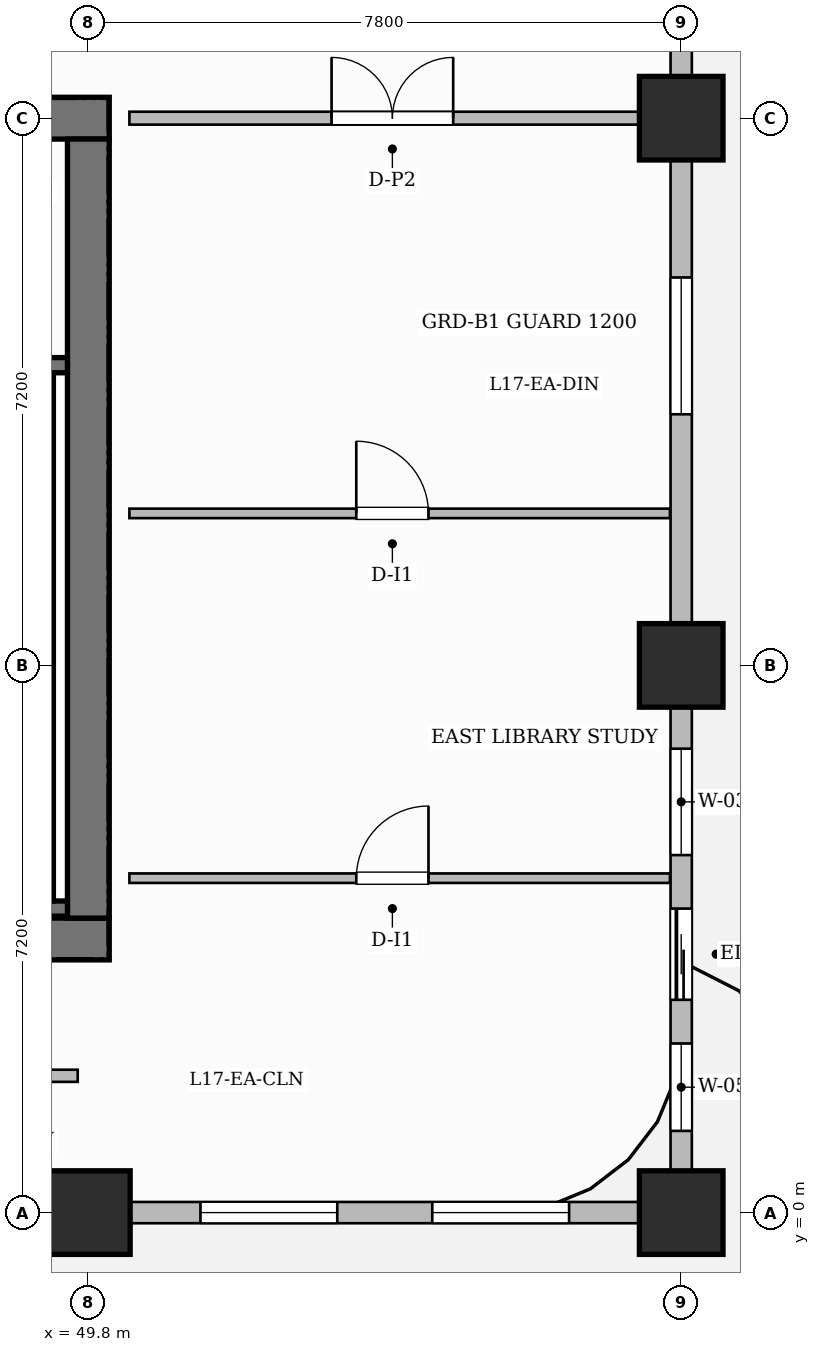
"""IFC4 building model, lengths in metres.
Left out: names, types, materials, properties, quantities, classifications, styles, units other than length and angle.
Written with IfcOpenShell. Run it as: python <this file> out.ifc"""

import sys

from ifc_helpers import new_model, si_unit, direction, frame, frame_2d, origin, origin_2d, place, context, subcontext, project, spatial, rectangle, extrude, source, transform, mapped, element, fill, save


model = new_model("IFC4")
c1 = context("Model", 3, precision=1e-05, world=origin(), true_north=direction((0.0, 1.0)))
c2 = subcontext(c1, "Body", "Model", "MODEL_VIEW")
j1 = project(units=[si_unit("LENGTHUNIT", "METRE"), si_unit("PLANEANGLEUNIT", "RADIAN")], contexts=[c1])
p1 = place(None, origin())
s1 = spatial("IfcSite", under=j1, at=p1, CompositionType="ELEMENT")
p2 = place(p1, origin())
s2 = spatial("IfcBuilding", under=s1, at=p2, CompositionType="ELEMENT")
p3 = place(p2, frame((0.0, 0.0, 73.1)))
s3 = spatial("IfcBuildingStorey", under=s2, at=p3, CompositionType="ELEMENT", Elevation=73.1)
p4 = place(p3, frame((34.525, 3.6, 0.0), z_axis=(0.0, 0.0, 1.0), x_axis=(1.0, 0.0, 0.0)))
e1 = element("IfcWall", 1, at=p4, inside=s3, PredefinedType="SHEAR", context=c2, shape_type="SweptSolid", body=[
    extrude(rectangle(XDim=15.55, YDim=0.55, at=frame_2d((7.775, 0.0))), origin(), (0.0, 0.0, 1.0), 3.7),
])
p5 = place(p4, frame((4.825, 0.0, 0.0)))
e2 = element("IfcOpeningElement", 2, at=p5, cuts=e1, PredefinedType="OPENING", context=c2, shape_type="SweptSolid", body=[
    extrude(rectangle(XDim=0.9, YDim=2.1, at=frame_2d((0.45, 1.05))), frame((0.0, 0.285, 0.0), z_axis=(0.0, -1.0, 0.0), x_axis=(1.0, 0.0, 0.0)), (0.0, 0.0, 1.0), 0.57),
])
p6 = place(p4, frame((7.245, 0.0, 0.0)))
e3 = element("IfcOpeningElement", 3, at=p6, cuts=e1, PredefinedType="OPENING", context=c2, shape_type="SweptSolid", body=[
    extrude(rectangle(XDim=0.9, YDim=2.1, at=frame_2d((0.45, 1.05))), frame((0.0, 0.285, 0.0), z_axis=(0.0, -1.0, 0.0), x_axis=(1.0, 0.0, 0.0)), (0.0, 0.0, 1.0), 0.57),
])
p7 = place(p3, frame((34.525, 14.4, 0.0), z_axis=(0.0, 0.0, 1.0), x_axis=(1.0, 0.0, 0.0)))
e4 = element("IfcWall", 4, at=p7, inside=s3, PredefinedType="SHEAR", context=c2, shape_type="SweptSolid", body=[
    extrude(rectangle(XDim=15.55, YDim=0.55, at=frame_2d((7.775, 0.0))), origin(), (0.0, 0.0, 1.0), 3.7),
])
p8 = place(p7, frame((5.405, 0.0, 0.0)))
e5 = element("IfcOpeningElement", 5, at=p8, cuts=e4, PredefinedType="OPENING", context=c2, shape_type="SweptSolid", body=[
    extrude(rectangle(XDim=1.5, YDim=2.2, at=frame_2d((0.75, 1.1))), frame((0.0, 0.285, 0.0), z_axis=(0.0, -1.0, 0.0), x_axis=(1.0, 0.0, 0.0)), (0.0, 0.0, 1.0), 0.57),
])
p9 = place(p7, frame((1.62, 0.0, 0.0)))
e6 = element("IfcOpeningElement", 6, at=p9, cuts=e4, PredefinedType="OPENING", context=c2, shape_type="SweptSolid", body=[
    extrude(rectangle(XDim=1.05, YDim=2.15, at=frame_2d((0.525, 1.075))), frame((0.0, 0.285, 0.0), z_axis=(0.0, -1.0, 0.0), x_axis=(1.0, 0.0, 0.0)), (0.0, 0.0, 1.0), 0.57),
])
p10 = place(p7, frame((11.25, 0.0, 0.0)))
e7 = element("IfcOpeningElement", 7, at=p10, cuts=e4, PredefinedType="OPENING", context=c2, shape_type="SweptSolid", body=[
    extrude(rectangle(XDim=1.05, YDim=2.15, at=frame_2d((0.525, 1.075))), frame((0.0, 0.285, 0.0), z_axis=(0.0, -1.0, 0.0), x_axis=(1.0, 0.0, 0.0)), (0.0, 0.0, 1.0), 0.57),
])
p11 = place(p3, frame((49.8, 3.875, 0.0), z_axis=(0.0, 0.0, 1.0), x_axis=(0.0, 1.0, 0.0)))
e8 = element("IfcWall", 8, at=p11, inside=s3, PredefinedType="SHEAR", context=c2, shape_type="SweptSolid", body=[
    extrude(rectangle(XDim=10.25, YDim=0.55, at=frame_2d((5.125, 0.0))), origin(), (0.0, 0.0, 1.0), 3.7),
])
m1 = source(origin(), c2, "Body", "SweptSolid", [
    extrude(rectangle(XDim=1.1, YDim=1.1, at=origin_2d()), origin(), (0.0, 0.0, 1.0), 3.7),
])
for number, where, z_axis, x_axis in (
    (9, (49.8, 0.0, 0.0), (0.0, 0.0, 1.0), (1.0, 0.0, 0.0)),
    (10, (57.6, 0.0, 0.0), (0.0, 0.0, 1.0), (1.0, 0.0, 0.0)),
    (11, (57.6, 7.2, 0.0), (0.0, 0.0, 1.0), (1.0, 0.0, 0.0)),
    (12, (57.6, 14.4, 0.0), (0.0, 0.0, 1.0), (1.0, 0.0, 0.0)),
):
    element("IfcColumn", number, at=place(p3, frame(where, z_axis=z_axis, x_axis=x_axis)), inside=s3, PredefinedType="COLUMN", context=c2, shape_type="MappedRepresentation", body=[
        mapped(m1, transform((0.0, 0.0, 0.0), scale=1.0)),
    ])
p12 = place(p3, frame((43.12, 4.0, 0.0), z_axis=(0.0, 0.0, 1.0), x_axis=(1.0, 0.0, 0.0)))
e13 = element("IfcWall", 13, at=p12, inside=s3, PredefinedType="SHEAR", context=c2, shape_type="SweptSolid", body=[
    extrude(rectangle(XDim=6.405, YDim=0.2, at=frame_2d((3.202, 0.0))), origin(), (0.0, 0.0, 1.0), 3.7),
])
p13 = place(p3, frame((49.24, 4.1, 0.0), z_axis=(0.0, 0.0, 1.0), x_axis=(0.0, 1.0, 0.0)))
e14 = element("IfcWall", 14, at=p13, inside=s3, PredefinedType="SHEAR", context=c2, shape_type="SweptSolid", body=[
    extrude(rectangle(XDim=6.95, YDim=0.2, at=frame_2d((3.475, 0.0))), origin(), (0.0, 0.0, 1.0), 3.7),
])
p14 = place(p3, frame((43.12, 11.15, 0.0), z_axis=(0.0, 0.0, 1.0), x_axis=(1.0, 0.0, 0.0)))
e15 = element("IfcWall", 15, at=p14, inside=s3, PredefinedType="SHEAR", context=c2, shape_type="SweptSolid", body=[
    extrude(rectangle(XDim=6.405, YDim=0.2, at=frame_2d((3.202, 0.0))), origin(), (0.0, 0.0, 1.0), 3.7),
])
p15 = place(p14, frame((1.045, 0.0, 0.0)))
e16 = element("IfcOpeningElement", 16, at=p15, cuts=e15, PredefinedType="OPENING", context=c2, shape_type="SweptSolid", body=[
    extrude(rectangle(XDim=1.05, YDim=2.2, at=frame_2d((0.525, 1.1))), frame((0.0, 0.11, 0.0), z_axis=(0.0, -1.0, 0.0), x_axis=(1.0, 0.0, 0.0)), (0.0, 0.0, 1.0), 0.22),
])
p16 = place(p14, frame((4.125, 0.0, 0.0)))
e17 = element("IfcOpeningElement", 17, at=p16, cuts=e15, PredefinedType="OPENING", context=c2, shape_type="SweptSolid", body=[
    extrude(rectangle(XDim=1.05, YDim=2.2, at=frame_2d((0.525, 1.1))), frame((0.0, 0.11, 0.0), z_axis=(0.0, -1.0, 0.0), x_axis=(1.0, 0.0, 0.0)), (0.0, 0.0, 1.0), 0.22),
])
p17 = place(p3, frame((30.29, 1.8, 0.0), z_axis=(0.0, 0.0, 1.0), x_axis=(1.0, 0.0, 0.0)))
e18 = element("IfcWall", 18, at=p17, inside=s3, PredefinedType="PARTITIONING", context=c2, shape_type="SweptSolid", body=[
    extrude(rectangle(XDim=19.37, YDim=0.16, at=frame_2d((9.685, 0.0))), origin(), (0.0, 0.0, 1.0), 3.45),
])
p18 = place(p17, frame((2.916, 0.0, 0.0)))
e19 = element("IfcOpeningElement", 19, at=p18, cuts=e18, PredefinedType="OPENING", context=c2, shape_type="SweptSolid", body=[
    extrude(rectangle(XDim=0.9, YDim=2.15, at=frame_2d((0.45, 1.075))), frame((0.0, 0.09, 0.0), z_axis=(0.0, -1.0, 0.0), x_axis=(1.0, 0.0, 0.0)), (0.0, 0.0, 1.0), 0.18),
])
p19 = place(p17, frame((9.66, 0.0, 0.0)))
e20 = element("IfcOpeningElement", 20, at=p19, cuts=e18, PredefinedType="OPENING", context=c2, shape_type="SweptSolid", body=[
    extrude(rectangle(XDim=0.9, YDim=2.15, at=frame_2d((0.45, 1.075))), frame((0.0, 0.09, 0.0), z_axis=(0.0, -1.0, 0.0), x_axis=(1.0, 0.0, 0.0)), (0.0, 0.0, 1.0), 0.18),
])
p20 = place(p17, frame((15.86, 0.0, 0.0)))
e21 = element("IfcOpeningElement", 21, at=p20, cuts=e18, PredefinedType="OPENING", context=c2, shape_type="SweptSolid", body=[
    extrude(rectangle(XDim=0.9, YDim=2.15, at=frame_2d((0.45, 1.075))), frame((0.0, 0.09, 0.0), z_axis=(0.0, -1.0, 0.0), x_axis=(1.0, 0.0, 0.0)), (0.0, 0.0, 1.0), 0.18),
])
p21 = place(p3, frame((50.34, 14.4, 0.0), z_axis=(0.0, 0.0, 1.0), x_axis=(1.0, 0.0, 0.0)))
e22 = element("IfcWall", 22, at=p21, inside=s3, PredefinedType="PARTITIONING", context=c2, shape_type="SweptSolid", body=[
    extrude(rectangle(XDim=7.07, YDim=0.17, at=frame_2d((3.535, 0.0))), origin(), (0.0, 0.0, 1.0), 2.885),
])
p22 = place(p21, frame((2.66, 0.0, 0.0)))
e23 = element("IfcOpeningElement", 23, at=p22, cuts=e22, PredefinedType="OPENING", context=c2, shape_type="SweptSolid", body=[
    extrude(rectangle(XDim=1.6, YDim=2.4, at=frame_2d((0.8, 1.2))), frame((0.0, 0.095, 0.0), z_axis=(0.0, -1.0, 0.0), x_axis=(1.0, 0.0, 0.0)), (0.0, 0.0, 1.0), 0.19),
])
p23 = place(p3, frame((50.34, 9.2, 0.0), z_axis=(0.0, 0.0, 1.0), x_axis=(1.0, 0.0, 0.0)))
e24 = element("IfcWall", 24, at=p23, inside=s3, PredefinedType="PARTITIONING", context=c2, shape_type="SweptSolid", body=[
    extrude(rectangle(XDim=7.112, YDim=0.125, at=frame_2d((3.556, 0.0))), origin(), (0.0, 0.0, 1.0), 3.45),
])
p24 = place(p23, frame((2.985, 0.0, 0.0)))
e25 = element("IfcOpeningElement", 25, at=p24, cuts=e24, PredefinedType="OPENING", context=c2, shape_type="SweptSolid", body=[
    extrude(rectangle(XDim=0.95, YDim=2.15, at=frame_2d((0.475, 1.075))), frame((0.0, 0.073, 0.0), z_axis=(0.0, -1.0, 0.0), x_axis=(1.0, 0.0, 0.0)), (0.0, 0.0, 1.0), 0.145),
])
p25 = place(p3, frame((50.34, 4.4, 0.0), z_axis=(0.0, 0.0, 1.0), x_axis=(1.0, 0.0, 0.0)))
e26 = element("IfcWall", 26, at=p25, inside=s3, PredefinedType="PARTITIONING", context=c2, shape_type="SweptSolid", body=[
    extrude(rectangle(XDim=7.112, YDim=0.125, at=frame_2d((3.556, 0.0))), origin(), (0.0, 0.0, 1.0), 3.45),
])
p26 = place(p25, frame((2.985, 0.0, 0.0)))
e27 = element("IfcOpeningElement", 27, at=p26, cuts=e26, PredefinedType="OPENING", context=c2, shape_type="SweptSolid", body=[
    extrude(rectangle(XDim=0.95, YDim=2.15, at=frame_2d((0.475, 1.075))), frame((0.0, 0.073, 0.0), z_axis=(0.0, -1.0, 0.0), x_axis=(1.0, 0.0, 0.0)), (0.0, 0.0, 1.0), 0.145),
])
p27 = place(p3, frame((14.4, 0.0, 0.0), z_axis=(0.0, 0.0, 1.0), x_axis=(1.0, 0.0, 0.0)))
e28 = element("IfcWall", 28, at=p27, inside=s3, PredefinedType="SOLIDWALL", context=c2, shape_type="SweptSolid", body=[
    extrude(rectangle(XDim=43.2, YDim=0.28, at=frame_2d((21.6, 0.0))), origin(), (0.0, 0.0, 1.0), 2.885),
])
p28 = place(p27, frame((0.85, 0.0, 0.0)))
e29 = element("IfcOpeningElement", 29, at=p28, cuts=e28, PredefinedType="OPENING", context=c2, shape_type="SweptSolid", body=[
    extrude(rectangle(XDim=1.2, YDim=2.2, at=frame_2d((0.6, 1.1))), frame((0.0, 0.15, 0.0), z_axis=(0.0, -1.0, 0.0), x_axis=(1.0, 0.0, 0.0)), (0.0, 0.0, 1.0), 0.3),
])
p29 = place(p27, frame((2.811, 0.0, 0.8)))
e30 = element("IfcOpeningElement", 30, at=p29, cuts=e28, PredefinedType="OPENING", context=c2, shape_type="SweptSolid", body=[
    extrude(rectangle(XDim=1.8, YDim=1.85, at=frame_2d((0.9, 0.925))), frame((0.0, 0.15, 0.0), z_axis=(0.0, -1.0, 0.0), x_axis=(1.0, 0.0, 0.0)), (0.0, 0.0, 1.0), 0.3),
])
p30 = place(p27, frame((5.269, 0.0, 0.8)))
e31 = element("IfcOpeningElement", 31, at=p30, cuts=e28, PredefinedType="OPENING", context=c2, shape_type="SweptSolid", body=[
    extrude(rectangle(XDim=0.95, YDim=1.75, at=frame_2d((0.475, 0.875))), frame((0.0, 0.15, 0.0), z_axis=(0.0, -1.0, 0.0), x_axis=(1.0, 0.0, 0.0)), (0.0, 0.0, 1.0), 0.3),
])
p31 = place(p27, frame((8.389, 0.0, 0.8)))
e32 = element("IfcOpeningElement", 32, at=p31, cuts=e28, PredefinedType="OPENING", context=c2, shape_type="SweptSolid", body=[
    extrude(rectangle(XDim=1.8, YDim=1.85, at=frame_2d((0.9, 0.925))), frame((0.0, 0.15, 0.0), z_axis=(0.0, -1.0, 0.0), x_axis=(1.0, 0.0, 0.0)), (0.0, 0.0, 1.0), 0.3),
])
p32 = place(p27, frame((11.197, 0.0, 0.8)))
e33 = element("IfcOpeningElement", 33, at=p32, cuts=e28, PredefinedType="OPENING", context=c2, shape_type="SweptSolid", body=[
    extrude(rectangle(XDim=1.8, YDim=1.85, at=frame_2d((0.9, 0.925))), frame((0.0, 0.15, 0.0), z_axis=(0.0, -1.0, 0.0), x_axis=(1.0, 0.0, 0.0)), (0.0, 0.0, 1.0), 0.3),
])
p33 = place(p27, frame((16.804, 0.0, 0.8)))
e34 = element("IfcOpeningElement", 34, at=p33, cuts=e28, PredefinedType="OPENING", context=c2, shape_type="SweptSolid", body=[
    extrude(rectangle(XDim=1.8, YDim=1.85, at=frame_2d((0.9, 0.925))), frame((0.0, 0.15, 0.0), z_axis=(0.0, -1.0, 0.0), x_axis=(1.0, 0.0, 0.0)), (0.0, 0.0, 1.0), 0.3),
])
p34 = place(p27, frame((21.521, 0.0, 0.8)))
e35 = element("IfcOpeningElement", 35, at=p34, cuts=e28, PredefinedType="OPENING", context=c2, shape_type="SweptSolid", body=[
    extrude(rectangle(XDim=0.95, YDim=1.75, at=frame_2d((0.475, 0.875))), frame((0.0, 0.15, 0.0), z_axis=(0.0, -1.0, 0.0), x_axis=(1.0, 0.0, 0.0)), (0.0, 0.0, 1.0), 0.3),
])
p35 = place(p27, frame((23.904, 0.0, 0.8)))
e36 = element("IfcOpeningElement", 36, at=p35, cuts=e28, PredefinedType="OPENING", context=c2, shape_type="SweptSolid", body=[
    extrude(rectangle(XDim=1.8, YDim=1.85, at=frame_2d((0.9, 0.925))), frame((0.0, 0.15, 0.0), z_axis=(0.0, -1.0, 0.0), x_axis=(1.0, 0.0, 0.0)), (0.0, 0.0, 1.0), 0.3),
])
p36 = place(p27, frame((29.681, 0.0, 0.8)))
e37 = element("IfcOpeningElement", 37, at=p36, cuts=e28, PredefinedType="OPENING", context=c2, shape_type="SweptSolid", body=[
    extrude(rectangle(XDim=1.8, YDim=1.85, at=frame_2d((0.9, 0.925))), frame((0.0, 0.15, 0.0), z_axis=(0.0, -1.0, 0.0), x_axis=(1.0, 0.0, 0.0)), (0.0, 0.0, 1.0), 0.3),
])
p37 = place(p27, frame((32.327, 0.0, 0.8)))
e38 = element("IfcOpeningElement", 38, at=p37, cuts=e28, PredefinedType="OPENING", context=c2, shape_type="SweptSolid", body=[
    extrude(rectangle(XDim=1.8, YDim=1.85, at=frame_2d((0.9, 0.925))), frame((0.0, 0.15, 0.0), z_axis=(0.0, -1.0, 0.0), x_axis=(1.0, 0.0, 0.0)), (0.0, 0.0, 1.0), 0.3),
])
p38 = place(p27, frame((36.875, 0.0, 0.8)))
e39 = element("IfcOpeningElement", 39, at=p38, cuts=e28, PredefinedType="OPENING", context=c2, shape_type="SweptSolid", body=[
    extrude(rectangle(XDim=1.8, YDim=1.85, at=frame_2d((0.9, 0.925))), frame((0.0, 0.15, 0.0), z_axis=(0.0, -1.0, 0.0), x_axis=(1.0, 0.0, 0.0)), (0.0, 0.0, 1.0), 0.3),
])
p39 = place(p27, frame((39.925, 0.0, 0.8)))
e40 = element("IfcOpeningElement", 40, at=p39, cuts=e28, PredefinedType="OPENING", context=c2, shape_type="SweptSolid", body=[
    extrude(rectangle(XDim=1.8, YDim=1.85, at=frame_2d((0.9, 0.925))), frame((0.0, 0.15, 0.0), z_axis=(0.0, -1.0, 0.0), x_axis=(1.0, 0.0, 0.0)), (0.0, 0.0, 1.0), 0.3),
])
p40 = place(p3, frame((57.6, 0.05, 0.0), z_axis=(0.0, 0.0, 1.0), x_axis=(0.0, 1.0, 0.0)))
e41 = element("IfcWall", 41, at=p40, inside=s3, PredefinedType="SOLIDWALL", context=c2, shape_type="SweptSolid", body=[
    extrude(rectangle(XDim=21.5, YDim=0.28, at=frame_2d((10.75, 0.0))), origin(), (0.0, 0.0, 1.0), 2.885),
])
p41 = place(p40, frame((2.75, 0.0, 0.0)))
e42 = element("IfcOpeningElement", 42, at=p41, cuts=e41, PredefinedType="OPENING", context=c2, shape_type="SweptSolid", body=[
    extrude(rectangle(XDim=1.2, YDim=2.2, at=frame_2d((0.6, 1.1))), frame((0.0, 0.15, 0.0), z_axis=(0.0, -1.0, 0.0), x_axis=(1.0, 0.0, 0.0)), (0.0, 0.0, 1.0), 0.3),
])
p42 = place(p40, frame((1.025, 0.0, 0.8)))
e43 = element("IfcOpeningElement", 43, at=p42, cuts=e41, PredefinedType="OPENING", context=c2, shape_type="SweptSolid", body=[
    extrude(rectangle(XDim=1.15, YDim=1.8, at=frame_2d((0.575, 0.9))), frame((0.0, 0.15, 0.0), z_axis=(0.0, -1.0, 0.0), x_axis=(1.0, 0.0, 0.0)), (0.0, 0.0, 1.0), 0.3),
])
p43 = place(p40, frame((4.654, 0.0, 0.8)))
e44 = element("IfcOpeningElement", 44, at=p43, cuts=e41, PredefinedType="OPENING", context=c2, shape_type="SweptSolid", body=[
    extrude(rectangle(XDim=1.4, YDim=1.85, at=frame_2d((0.7, 0.925))), frame((0.0, 0.15, 0.0), z_axis=(0.0, -1.0, 0.0), x_axis=(1.0, 0.0, 0.0)), (0.0, 0.0, 1.0), 0.3),
])
p44 = place(p40, frame((10.454, 0.0, 0.8)))
e45 = element("IfcOpeningElement", 45, at=p44, cuts=e41, PredefinedType="OPENING", context=c2, shape_type="SweptSolid", body=[
    extrude(rectangle(XDim=1.8, YDim=1.85, at=frame_2d((0.9, 0.925))), frame((0.0, 0.15, 0.0), z_axis=(0.0, -1.0, 0.0), x_axis=(1.0, 0.0, 0.0)), (0.0, 0.0, 1.0), 0.3),
])
p45 = place(p40, frame((15.621, 0.0, 0.8)))
e46 = element("IfcOpeningElement", 46, at=p45, cuts=e41, PredefinedType="OPENING", context=c2, shape_type="SweptSolid", body=[
    extrude(rectangle(XDim=1.4, YDim=1.85, at=frame_2d((0.7, 0.925))), frame((0.0, 0.15, 0.0), z_axis=(0.0, -1.0, 0.0), x_axis=(1.0, 0.0, 0.0)), (0.0, 0.0, 1.0), 0.3),
])
p46 = place(p40, frame((18.229, 0.0, 0.8)))
e47 = element("IfcOpeningElement", 47, at=p46, cuts=e41, PredefinedType="OPENING", context=c2, shape_type="SweptSolid", body=[
    extrude(rectangle(XDim=1.8, YDim=1.85, at=frame_2d((0.9, 0.925))), frame((0.0, 0.15, 0.0), z_axis=(0.0, -1.0, 0.0), x_axis=(1.0, 0.0, 0.0)), (0.0, 0.0, 1.0), 0.3),
])
m2 = source(origin(), c2, "Body", "SweptSolid", [
    extrude(rectangle(XDim=1.6, YDim=2.4, at=frame_2d((0.8, 1.2))), frame((0.0, 0.025, 0.0), z_axis=(0.0, -1.0, 0.0), x_axis=(1.0, 0.0, 0.0)), (0.0, 0.0, 1.0), 0.05),
])
p47 = place(p22, origin())
e48 = element("IfcDoor", 48, at=p47, inside=s3, OperationType="DOUBLE_DOOR_SINGLE_SWING", PredefinedType="DOOR", context=c2, shape_type="MappedRepresentation", body=[
    mapped(m2, transform((0.0, 0.0, 0.0), scale=1.0)),
])
fill(e23, e48)
m3 = source(origin(), c2, "Body", "SweptSolid", [
    extrude(rectangle(XDim=0.95, YDim=2.15, at=frame_2d((0.475, 1.075))), frame((0.0, 0.025, 0.0), z_axis=(0.0, -1.0, 0.0), x_axis=(1.0, 0.0, 0.0)), (0.0, 0.0, 1.0), 0.05),
])
p48 = place(p24, origin())
e49 = element("IfcDoor", 49, at=p48, inside=s3, OperationType="SINGLE_SWING_LEFT", PredefinedType="DOOR", context=c2, shape_type="MappedRepresentation", body=[
    mapped(m3, transform((0.0, 0.0, 0.0), scale=1.0)),
])
fill(e25, e49)
p49 = place(p26, origin())
e50 = element("IfcDoor", 50, at=p49, inside=s3, OperationType="SINGLE_SWING_RIGHT", PredefinedType="DOOR", context=c2, shape_type="MappedRepresentation", body=[
    mapped(m3, transform((0.0, 0.0, 0.0), scale=1.0)),
])
fill(e27, e50)
m4 = source(origin(), c2, "Body", "SweptSolid", [
    extrude(rectangle(XDim=1.2, YDim=2.2, at=frame_2d((0.6, 1.1))), frame((0.0, 0.025, 0.0), z_axis=(0.0, -1.0, 0.0), x_axis=(1.0, 0.0, 0.0)), (0.0, 0.0, 1.0), 0.05),
])
p50 = place(p41, origin())
e51 = element("IfcDoor", 51, at=p50, inside=s3, OperationType="SLIDING_TO_LEFT", PredefinedType="DOOR", context=c2, shape_type="MappedRepresentation", body=[
    mapped(m4, transform((0.0, 0.0, 0.0), scale=1.0)),
])
fill(e42, e51)
m5 = source(origin(), c2, "Body", "SweptSolid", [
    extrude(rectangle(XDim=1.8, YDim=1.85, at=frame_2d((0.9, 0.925))), frame((0.0, 0.03, 0.0), z_axis=(0.0, -1.0, 0.0), x_axis=(1.0, 0.0, 0.0)), (0.0, 0.0, 1.0), 0.06),
])
p51 = place(p38, origin())
e52 = element("IfcWindow", 52, at=p51, inside=s3, PartitioningType="DOUBLE_PANEL_VERTICAL", PredefinedType="WINDOW", context=c2, shape_type="MappedRepresentation", body=[
    mapped(m5, transform((0.0, 0.0, 0.0), scale=1.0)),
])
fill(e39, e52)
p52 = place(p39, origin())
e53 = element("IfcWindow", 53, at=p52, inside=s3, PartitioningType="DOUBLE_PANEL_VERTICAL", PredefinedType="WINDOW", context=c2, shape_type="MappedRepresentation", body=[
    mapped(m5, transform((0.0, 0.0, 0.0), scale=1.0)),
])
fill(e40, e53)
m6 = source(origin(), c2, "Body", "SweptSolid", [
    extrude(rectangle(XDim=1.15, YDim=1.8, at=frame_2d((0.575, 0.9))), frame((0.0, 0.03, 0.0), z_axis=(0.0, -1.0, 0.0), x_axis=(1.0, 0.0, 0.0)), (0.0, 0.0, 1.0), 0.06),
])
p53 = place(p42, origin())
e54 = element("IfcWindow", 54, at=p53, inside=s3, PartitioningType="SINGLE_PANEL", PredefinedType="WINDOW", context=c2, shape_type="MappedRepresentation", body=[
    mapped(m6, transform((0.0, 0.0, 0.0), scale=1.0)),
])
fill(e43, e54)
m7 = source(origin(), c2, "Body", "SweptSolid", [
    extrude(rectangle(XDim=1.4, YDim=1.85, at=frame_2d((0.7, 0.925))), frame((0.0, 0.03, 0.0), z_axis=(0.0, -1.0, 0.0), x_axis=(1.0, 0.0, 0.0)), (0.0, 0.0, 1.0), 0.06),
])
p54 = place(p43, origin())
e55 = element("IfcWindow", 55, at=p54, inside=s3, PartitioningType="SINGLE_PANEL", PredefinedType="WINDOW", context=c2, shape_type="MappedRepresentation", body=[
    mapped(m7, transform((0.0, 0.0, 0.0), scale=1.0)),
])
fill(e44, e55)
p55 = place(p44, origin())
e56 = element("IfcWindow", 56, at=p55, inside=s3, PartitioningType="DOUBLE_PANEL_VERTICAL", PredefinedType="WINDOW", context=c2, shape_type="MappedRepresentation", body=[
    mapped(m5, transform((0.0, 0.0, 0.0), scale=1.0)),
])
fill(e45, e56)
save(model, sys.argv[1])
